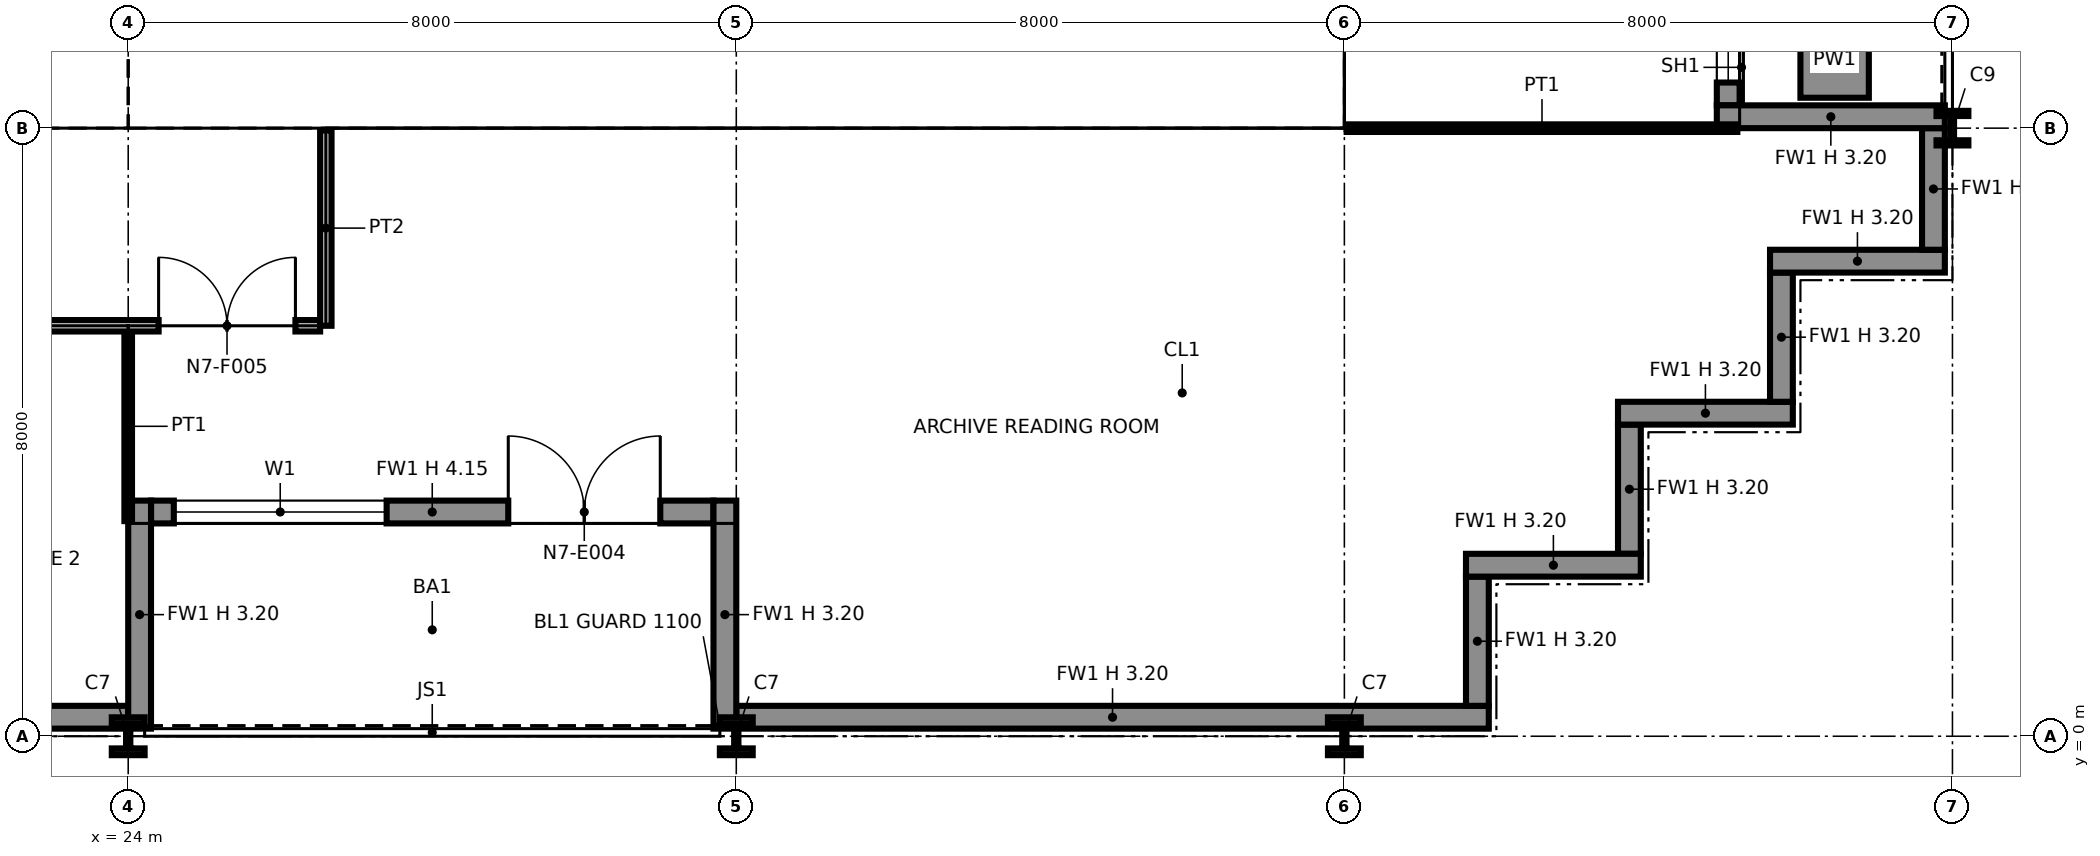
"""IFC4 building model, lengths in metres.
Left out: names, types, materials, properties, quantities, classifications, styles, units other than length and angle.
Written with IfcOpenShell. Run it as: python <this file> out.ifc"""

import sys

from ifc_helpers import new_model, si_unit, direction, frame, frame_2d, origin, origin_2d, place, context, subcontext, project, spatial, polyline, rectangle, i_section, outline, extrude, element, fill, save


model = new_model("IFC4")
c1 = context("Model", 3, precision=1e-05, world=origin(), true_north=direction((0.0, 1.0)))
c2 = subcontext(c1, "Body", "Model", "MODEL_VIEW")
j1 = project(units=[si_unit("LENGTHUNIT", "METRE"), si_unit("PLANEANGLEUNIT", "RADIAN")], contexts=[c1])
p1 = place(None, origin())
s1 = spatial("IfcSite", under=j1, at=p1, CompositionType="ELEMENT")
p2 = place(p1, origin())
s2 = spatial("IfcBuilding", under=s1, at=p2, CompositionType="ELEMENT")
p3 = place(p2, frame((0.0, 0.0, 109.6)))
s3 = spatial("IfcBuildingStorey", under=s2, at=p3, CompositionType="ELEMENT", Elevation=109.6)
p4 = place(p3, frame((24.0, 0.0, 0.0), z_axis=(0.0, 0.0, 1.0), x_axis=(1.0, 0.0, 0.0)))
e1 = element("IfcColumn", 1, at=p4, inside=s3, PredefinedType="COLUMN", context=c2, shape_type="SweptSolid", body=[
    extrude(i_section(OverallWidth=0.432, OverallDepth=0.498, WebThickness=0.056, FlangeThickness=0.089, at=origin_2d()), origin(), (0.0, 0.0, 1.0), 4.15),
])
p5 = place(p3, frame((24.0, 8.0, 0.0), z_axis=(0.0, 0.0, 1.0), x_axis=(1.0, 0.0, 0.0)))
e2 = element("IfcColumn", 2, at=p5, inside=s3, PredefinedType="COLUMN", context=c2, shape_type="SweptSolid", body=[
    extrude(i_section(OverallWidth=0.411, OverallDepth=0.434, WebThickness=0.036, FlangeThickness=0.057, at=origin_2d()), origin(), (0.0, 0.0, 1.0), 4.15),
])
p6 = place(p3, frame((32.0, 0.0, 0.0), z_axis=(0.0, 0.0, 1.0), x_axis=(1.0, 0.0, 0.0)))
e3 = element("IfcColumn", 3, at=p6, inside=s3, PredefinedType="COLUMN", context=c2, shape_type="SweptSolid", body=[
    extrude(i_section(OverallWidth=0.432, OverallDepth=0.498, WebThickness=0.056, FlangeThickness=0.089, at=origin_2d()), origin(), (0.0, 0.0, 1.0), 4.15),
])
p7 = place(p3, frame((32.0, 8.0, 0.0), z_axis=(0.0, 0.0, 1.0), x_axis=(1.0, 0.0, 0.0)))
e4 = element("IfcColumn", 4, at=p7, inside=s3, PredefinedType="COLUMN", context=c2, shape_type="SweptSolid", body=[
    extrude(i_section(OverallWidth=0.406, OverallDepth=0.417, WebThickness=0.03, FlangeThickness=0.048, at=origin_2d()), origin(), (0.0, 0.0, 1.0), 4.15),
])
p8 = place(p3, frame((40.0, 0.0, 0.0), z_axis=(0.0, 0.0, 1.0), x_axis=(1.0, 0.0, 0.0)))
e5 = element("IfcColumn", 5, at=p8, inside=s3, PredefinedType="COLUMN", context=c2, shape_type="SweptSolid", body=[
    extrude(i_section(OverallWidth=0.432, OverallDepth=0.498, WebThickness=0.056, FlangeThickness=0.089, at=origin_2d()), origin(), (0.0, 0.0, 1.0), 4.15),
])
p9 = place(p3, frame((40.0, 8.0, 0.0), z_axis=(0.0, 0.0, 1.0), x_axis=(1.0, 0.0, 0.0)))
e6 = element("IfcColumn", 6, at=p9, inside=s3, PredefinedType="COLUMN", context=c2, shape_type="SweptSolid", body=[
    extrude(i_section(OverallWidth=0.406, OverallDepth=0.417, WebThickness=0.03, FlangeThickness=0.048, at=origin_2d()), origin(), (0.0, 0.0, 1.0), 4.15),
])
p10 = place(p3, frame((48.0, 8.0, 0.0), z_axis=(0.0, 0.0, 1.0), x_axis=(1.0, 0.0, 0.0)))
e7 = element("IfcColumn", 7, at=p10, inside=s3, PredefinedType="COLUMN", context=c2, shape_type="SweptSolid", body=[
    extrude(i_section(OverallWidth=0.419, OverallDepth=0.455, WebThickness=0.042, FlangeThickness=0.068, at=origin_2d()), origin(), (0.0, 0.0, 1.0), 4.15),
])
p11 = place(p3, frame((16.0, 0.25, 0.0), z_axis=(0.0, 0.0, 1.0), x_axis=(1.0, 0.0, 0.0)))
e8 = element("IfcWall", 8, at=p11, inside=s3, PredefinedType="SOLIDWALL", context=c2, shape_type="SweptSolid", body=[
    extrude(rectangle(XDim=8.0, YDim=0.3, at=frame_2d((4.0, 0.0))), origin(), (0.0, 0.0, 1.0), 3.199),
])
p12 = place(p3, frame((24.3, 2.95, 0.0), z_axis=(0.0, 0.0, 1.0), x_axis=(1.0, 0.0, 0.0)))
e9 = element("IfcWall", 9, at=p12, inside=s3, PredefinedType="SOLIDWALL", context=c2, shape_type="SweptSolid", body=[
    extrude(rectangle(XDim=7.4, YDim=0.3, at=frame_2d((3.7, 0.0))), origin(), (0.0, 0.0, 1.0), 4.15),
])
p13 = place(p12, frame((0.3, 0.0, 0.9)))
e10 = element("IfcOpeningElement", 10, at=p13, cuts=e9, PredefinedType="OPENING", context=c2, shape_type="SweptSolid", body=[
    extrude(rectangle(XDim=2.8, YDim=2.2, at=frame_2d((1.4, 1.1))), frame((0.0, 0.16, 0.0), z_axis=(0.0, -1.0, 0.0), x_axis=(1.0, 0.0, 0.0)), (0.0, 0.0, 1.0), 0.32),
])
p14 = place(p12, frame((4.7, 0.0, 0.0)))
e11 = element("IfcOpeningElement", 11, at=p14, cuts=e9, PredefinedType="OPENING", context=c2, shape_type="SweptSolid", body=[
    extrude(rectangle(XDim=2.0, YDim=2.4, at=frame_2d((1.0, 1.2))), frame((0.0, 0.16, 0.0), z_axis=(0.0, -1.0, 0.0), x_axis=(1.0, 0.0, 0.0)), (0.0, 0.0, 1.0), 0.32),
])
for number, where, z_axis, x_axis in (
    (12, (24.15, 0.1, 0.0), (0.0, 0.0, 1.0), (0.0, 1.0, 0.0)),
    (13, (31.85, 0.1, 0.0), (0.0, 0.0, 1.0), (0.0, 1.0, 0.0)),
):
    element("IfcWall", number, at=place(p3, frame(where, z_axis=z_axis, x_axis=x_axis)), inside=s3, PredefinedType="SOLIDWALL", context=c2, shape_type="SweptSolid", body=[
        extrude(rectangle(XDim=3.0, YDim=0.3, at=frame_2d((1.5, 0.0))), origin(), (0.0, 0.0, 1.0), 3.199),
    ])
p15 = place(p3, frame((32.0, 0.25, 0.0), z_axis=(0.0, 0.0, 1.0), x_axis=(1.0, 0.0, 0.0)))
e14 = element("IfcWall", 14, at=p15, inside=s3, PredefinedType="SOLIDWALL", context=c2, shape_type="SweptSolid", body=[
    extrude(rectangle(XDim=9.9, YDim=0.3, at=frame_2d((4.95, 0.0))), origin(), (0.0, 0.0, 1.0), 3.199),
])
p16 = place(p3, frame((41.75, 0.4, 0.0), z_axis=(0.0, 0.0, 1.0), x_axis=(0.0, 1.0, 0.0)))
e15 = element("IfcWall", 15, at=p16, inside=s3, PredefinedType="SOLIDWALL", context=c2, shape_type="SweptSolid", body=[
    extrude(rectangle(XDim=1.7, YDim=0.3, at=frame_2d((0.85, 0.0))), origin(), (0.0, 0.0, 1.0), 3.199),
])
p17 = place(p3, frame((41.6, 2.25, 0.0), z_axis=(0.0, 0.0, 1.0), x_axis=(1.0, 0.0, 0.0)))
e16 = element("IfcWall", 16, at=p17, inside=s3, PredefinedType="SOLIDWALL", context=c2, shape_type="SweptSolid", body=[
    extrude(rectangle(XDim=2.3, YDim=0.3, at=frame_2d((1.15, 0.0))), origin(), (0.0, 0.0, 1.0), 3.199),
])
p18 = place(p3, frame((43.75, 2.4, 0.0), z_axis=(0.0, 0.0, 1.0), x_axis=(0.0, 1.0, 0.0)))
e17 = element("IfcWall", 17, at=p18, inside=s3, PredefinedType="SOLIDWALL", context=c2, shape_type="SweptSolid", body=[
    extrude(rectangle(XDim=1.7, YDim=0.3, at=frame_2d((0.85, 0.0))), origin(), (0.0, 0.0, 1.0), 3.199),
])
p19 = place(p3, frame((43.6, 4.25, 0.0), z_axis=(0.0, 0.0, 1.0), x_axis=(1.0, 0.0, 0.0)))
e18 = element("IfcWall", 18, at=p19, inside=s3, PredefinedType="SOLIDWALL", context=c2, shape_type="SweptSolid", body=[
    extrude(rectangle(XDim=2.3, YDim=0.3, at=frame_2d((1.15, 0.0))), origin(), (0.0, 0.0, 1.0), 3.199),
])
p20 = place(p3, frame((45.75, 4.4, 0.0), z_axis=(0.0, 0.0, 1.0), x_axis=(0.0, 1.0, 0.0)))
e19 = element("IfcWall", 19, at=p20, inside=s3, PredefinedType="SOLIDWALL", context=c2, shape_type="SweptSolid", body=[
    extrude(rectangle(XDim=1.7, YDim=0.3, at=frame_2d((0.85, 0.0))), origin(), (0.0, 0.0, 1.0), 3.199),
])
p21 = place(p3, frame((45.6, 6.25, 0.0), z_axis=(0.0, 0.0, 1.0), x_axis=(1.0, 0.0, 0.0)))
e20 = element("IfcWall", 20, at=p21, inside=s3, PredefinedType="SOLIDWALL", context=c2, shape_type="SweptSolid", body=[
    extrude(rectangle(XDim=2.3, YDim=0.3, at=frame_2d((1.15, 0.0))), origin(), (0.0, 0.0, 1.0), 3.199),
])
p22 = place(p3, frame((47.75, 6.4, 0.0), z_axis=(0.0, 0.0, 1.0), x_axis=(0.0, 1.0, 0.0)))
e21 = element("IfcWall", 21, at=p22, inside=s3, PredefinedType="SOLIDWALL", context=c2, shape_type="SweptSolid", body=[
    extrude(rectangle(XDim=1.6, YDim=0.3, at=frame_2d((0.8, 0.0))), origin(), (0.0, 0.0, 1.0), 3.199),
])
p23 = place(p3, frame((45.05, 8.3, 0.0), z_axis=(0.0, 0.0, 1.0), x_axis=(0.0, 1.0, 0.0)))
e22 = element("IfcWall", 22, at=p23, inside=s3, PredefinedType="SOLIDWALL", context=c2, shape_type="SweptSolid", body=[
    extrude(rectangle(XDim=7.4, YDim=0.3, at=frame_2d((3.7, 0.0))), origin(), (0.0, 0.0, 1.0), 3.547),
])
p24 = place(p23, frame((0.3, 0.0, 0.9)))
e23 = element("IfcOpeningElement", 23, at=p24, cuts=e22, PredefinedType="OPENING", context=c2, shape_type="SweptSolid", body=[
    extrude(rectangle(XDim=2.8, YDim=2.2, at=frame_2d((1.4, 1.1))), frame((0.0, 0.16, 0.0), z_axis=(0.0, -1.0, 0.0), x_axis=(1.0, 0.0, 0.0)), (0.0, 0.0, 1.0), 0.32),
])
p25 = place(p23, frame((4.7, 0.0, 0.0)))
e24 = element("IfcOpeningElement", 24, at=p25, cuts=e22, PredefinedType="OPENING", context=c2, shape_type="SweptSolid", body=[
    extrude(rectangle(XDim=2.0, YDim=2.4, at=frame_2d((1.0, 1.2))), frame((0.0, 0.16, 0.0), z_axis=(0.0, -1.0, 0.0), x_axis=(1.0, 0.0, 0.0)), (0.0, 0.0, 1.0), 0.32),
])
p26 = place(p3, frame((47.9, 8.15, 0.0), z_axis=(0.0, 0.0, 1.0), x_axis=(-1.0, 0.0, 0.0)))
e25 = element("IfcWall", 25, at=p26, inside=s3, PredefinedType="SOLIDWALL", context=c2, shape_type="SweptSolid", body=[
    extrude(rectangle(XDim=3.0, YDim=0.3, at=frame_2d((1.5, 0.0))), origin(), (0.0, 0.0, 1.0), 3.199),
])
p27 = place(p3, frame((46.45, 8.4, 0.0), z_axis=(0.0, 0.0, 1.0), x_axis=(0.0, 1.0, 0.0)))
e26 = element("IfcWall", 26, at=p27, inside=s3, PredefinedType="SOLIDWALL", context=c2, shape_type="SweptSolid", body=[
    extrude(rectangle(XDim=3.2, YDim=0.9, at=frame_2d((1.6, 0.0))), origin(), (0.0, 0.0, 1.0), 0.6),
])
p28 = place(p3, frame((8.65, 8.75, 0.0), z_axis=(0.0, 0.0, 1.0), x_axis=(1.0, 0.0, 0.0)))
e27 = element("IfcWall", 27, at=p28, inside=s3, PredefinedType="PARTITIONING", context=c2, shape_type="SweptSolid", body=[
    extrude(outline(polyline([(0.0, 0.0), (14.7, 0.0), (14.7, 4.15), (7.489, 4.15), (7.488, 3.382), (7.212, 3.382), (7.211, 4.15), (0.0, 4.15), (0.0, 0.0)])), frame((0.0, 0.1, 0.0), z_axis=(0.0, -1.0, 0.0), x_axis=(1.0, 0.0, 0.0)), (0.0, 0.0, 1.0), 0.2),
])
p29 = place(p28, frame((1.3, 0.0, 0.0)))
e28 = element("IfcOpeningElement", 28, at=p29, cuts=e27, PredefinedType="OPENING", context=c2, shape_type="SweptSolid", body=[
    extrude(rectangle(XDim=1.4, YDim=2.1, at=frame_2d((0.7, 1.05))), frame((0.0, 0.11, 0.0), z_axis=(0.0, -1.0, 0.0), x_axis=(1.0, 0.0, 0.0)), (0.0, 0.0, 1.0), 0.22),
])
p30 = place(p28, frame((4.6, 0.0, 0.0)))
e29 = element("IfcOpeningElement", 29, at=p30, cuts=e27, PredefinedType="OPENING", context=c2, shape_type="SweptSolid", body=[
    extrude(rectangle(XDim=1.4, YDim=2.1, at=frame_2d((0.7, 1.05))), frame((0.0, 0.11, 0.0), z_axis=(0.0, -1.0, 0.0), x_axis=(1.0, 0.0, 0.0)), (0.0, 0.0, 1.0), 0.22),
])
p31 = place(p28, frame((10.4, 0.0, 0.0)))
e30 = element("IfcOpeningElement", 30, at=p31, cuts=e27, PredefinedType="OPENING", context=c2, shape_type="SweptSolid", body=[
    extrude(rectangle(XDim=1.2, YDim=2.1, at=frame_2d((0.6, 1.05))), frame((0.0, 0.11, 0.0), z_axis=(0.0, -1.0, 0.0), x_axis=(1.0, 0.0, 0.0)), (0.0, 0.0, 1.0), 0.22),
])
p32 = place(p3, frame((23.25, 8.85, 0.0), z_axis=(0.0, 0.0, 1.0), x_axis=(0.0, 1.0, 0.0)))
e31 = element("IfcWall", 31, at=p32, inside=s3, PredefinedType="PARTITIONING", context=c2, shape_type="SweptSolid", body=[
    extrude(outline(polyline([(0.0, 0.0), (14.3, 0.0), (14.3, 4.15), (11.269, 4.15), (11.268, 3.542), (11.032, 3.542), (11.031, 4.15), (7.289, 4.15), (7.288, 3.382), (7.012, 3.382), (7.011, 4.15), (1.269, 4.15), (1.268, 3.542), (1.032, 3.542), (1.031, 4.15), (0.0, 4.15), (0.0, 0.0)])), frame((0.0, 0.1, 0.0), z_axis=(0.0, -1.0, 0.0), x_axis=(1.0, 0.0, 0.0)), (0.0, 0.0, 1.0), 0.2),
])
p33 = place(p32, frame((8.3, 0.0, 0.0)))
e32 = element("IfcOpeningElement", 32, at=p33, cuts=e31, PredefinedType="OPENING", context=c2, shape_type="SweptSolid", body=[
    extrude(rectangle(XDim=1.8, YDim=2.1, at=frame_2d((0.9, 1.05))), frame((0.0, 0.11, 0.0), z_axis=(0.0, -1.0, 0.0), x_axis=(1.0, 0.0, 0.0)), (0.0, 0.0, 1.0), 0.22),
])
p34 = place(p3, frame((24.65, 8.75, 0.0), z_axis=(0.0, 0.0, 1.0), x_axis=(1.0, 0.0, 0.0)))
e33 = element("IfcWall", 33, at=p34, inside=s3, PredefinedType="PARTITIONING", context=c2, shape_type="SweptSolid", body=[
    extrude(outline(polyline([(0.0, 0.0), (14.7, 0.0), (14.7, 4.15), (7.489, 4.15), (7.488, 3.382), (7.212, 3.382), (7.211, 4.15), (0.0, 4.15), (0.0, 0.0)])), frame((0.0, 0.1, 0.0), z_axis=(0.0, -1.0, 0.0), x_axis=(1.0, 0.0, 0.0)), (0.0, 0.0, 1.0), 0.2),
])
p35 = place(p3, frame((24.75, 8.85, 0.0), z_axis=(0.0, 0.0, 1.0), x_axis=(0.0, 1.0, 0.0)))
e34 = element("IfcWall", 34, at=p35, inside=s3, PredefinedType="PARTITIONING", context=c2, shape_type="SweptSolid", body=[
    extrude(outline(polyline([(0.0, 0.0), (6.3, 0.0), (6.3, 4.15), (3.269, 4.15), (3.268, 3.542), (3.032, 3.542), (3.031, 4.15), (0.0, 4.15), (0.0, 0.0)])), frame((0.0, 0.1, 0.0), z_axis=(0.0, -1.0, 0.0), x_axis=(1.0, 0.0, 0.0)), (0.0, 0.0, 1.0), 0.2),
])
for number, where, z_axis, x_axis in (
    (35, (27.075, 8.85, 0.0), (0.0, 0.0, 1.0), (0.0, 1.0, 0.0)),
    (36, (29.225, 8.85, 0.0), (0.0, 0.0, 1.0), (0.0, 1.0, 0.0)),
):
    element("IfcWall", number, at=place(p3, frame(where, z_axis=z_axis, x_axis=x_axis)), inside=s3, PredefinedType="PARTITIONING", context=c2, shape_type="SweptSolid", body=[
        extrude(rectangle(XDim=3.0, YDim=0.15, at=frame_2d((1.5, 0.0))), origin(), (0.0, 0.0, 1.0), 4.15),
    ])
p36 = place(p3, frame((32.0, 8.85, 0.0), z_axis=(0.0, 0.0, 1.0), x_axis=(0.0, 1.0, 0.0)))
e37 = element("IfcWall", 37, at=p36, inside=s3, PredefinedType="PARTITIONING", context=c2, shape_type="SweptSolid", body=[
    extrude(rectangle(XDim=3.0, YDim=0.6, at=frame_2d((1.5, 0.0))), origin(), (0.0, 0.0, 1.0), 3.382),
])
for number, where, z_axis, x_axis in (
    (38, (35.6, 8.85, 0.0), (0.0, 0.0, 1.0), (0.0, 1.0, 0.0)),
    (39, (39.25, 8.85, 0.0), (0.0, 0.0, 1.0), (0.0, 1.0, 0.0)),
):
    element("IfcWall", number, at=place(p3, frame(where, z_axis=z_axis, x_axis=x_axis)), inside=s3, PredefinedType="PARTITIONING", context=c2, shape_type="SweptSolid", body=[
        extrude(rectangle(XDim=6.3, YDim=0.2, at=frame_2d((3.15, 0.0))), origin(), (0.0, 0.0, 1.0), 4.15),
    ])
p37 = place(p3, frame((24.0, 2.83, 0.0), z_axis=(0.0, 0.0, 1.0), x_axis=(0.0, 1.0, 0.0)))
e40 = element("IfcWall", 40, at=p37, inside=s3, PredefinedType="PARTITIONING", context=c2, shape_type="SweptSolid", body=[
    extrude(rectangle(XDim=2.495, YDim=0.1, at=frame_2d((1.248, 0.0))), origin(), (0.0, 0.0, 1.0), 3.194),
])
p38 = place(p3, frame((5.475, 5.4, 0.0), z_axis=(0.0, 0.0, 1.0), x_axis=(1.0, 0.0, 0.0)))
e41 = element("IfcWall", 41, at=p38, inside=s3, PredefinedType="PARTITIONING", context=c2, shape_type="SweptSolid", body=[
    extrude(rectangle(XDim=21.05, YDim=0.15, at=frame_2d((10.525, 0.0))), origin(), (0.0, 0.0, 1.0), 3.194),
])
p39 = place(p38, frame((13.025, 0.0, 0.0), z_axis=(0.0, 0.0, 1.0), x_axis=(-1.0, 0.0, 0.0)))
e42 = element("IfcOpeningElement", 42, at=p39, cuts=e41, PredefinedType="OPENING", context=c2, shape_type="SweptSolid", body=[
    extrude(rectangle(XDim=1.0, YDim=2.1, at=frame_2d((0.5, 1.05))), frame((0.0, 0.085, 0.0), z_axis=(0.0, -1.0, 0.0), x_axis=(1.0, 0.0, 0.0)), (0.0, 0.0, 1.0), 0.17),
])
p40 = place(p38, frame((17.025, 0.0, 0.0), z_axis=(0.0, 0.0, 1.0), x_axis=(-1.0, 0.0, 0.0)))
e43 = element("IfcOpeningElement", 43, at=p40, cuts=e41, PredefinedType="OPENING", context=c2, shape_type="SweptSolid", body=[
    extrude(rectangle(XDim=1.0, YDim=2.1, at=frame_2d((0.5, 1.05))), frame((0.0, 0.085, 0.0), z_axis=(0.0, -1.0, 0.0), x_axis=(1.0, 0.0, 0.0)), (0.0, 0.0, 1.0), 0.17),
])
p41 = place(p38, frame((5.025, 0.0, 0.0), z_axis=(0.0, 0.0, 1.0), x_axis=(-1.0, 0.0, 0.0)))
e44 = element("IfcOpeningElement", 44, at=p41, cuts=e41, PredefinedType="OPENING", context=c2, shape_type="SweptSolid", body=[
    extrude(rectangle(XDim=1.0, YDim=2.1, at=frame_2d((0.5, 1.05))), frame((0.0, 0.085, 0.0), z_axis=(0.0, -1.0, 0.0), x_axis=(1.0, 0.0, 0.0)), (0.0, 0.0, 1.0), 0.17),
])
p42 = place(p38, frame((9.025, 0.0, 0.0), z_axis=(0.0, 0.0, 1.0), x_axis=(-1.0, 0.0, 0.0)))
e45 = element("IfcOpeningElement", 45, at=p42, cuts=e41, PredefinedType="OPENING", context=c2, shape_type="SweptSolid", body=[
    extrude(rectangle(XDim=1.0, YDim=2.1, at=frame_2d((0.5, 1.05))), frame((0.0, 0.085, 0.0), z_axis=(0.0, -1.0, 0.0), x_axis=(1.0, 0.0, 0.0)), (0.0, 0.0, 1.0), 0.17),
])
p43 = place(p38, frame((18.925, 0.0, 0.0)))
e46 = element("IfcOpeningElement", 46, at=p43, cuts=e41, PredefinedType="OPENING", context=c2, shape_type="SweptSolid", body=[
    extrude(rectangle(XDim=1.8, YDim=2.1, at=frame_2d((0.9, 1.05))), frame((0.0, 0.085, 0.0), z_axis=(0.0, -1.0, 0.0), x_axis=(1.0, 0.0, 0.0)), (0.0, 0.0, 1.0), 0.17),
])
p44 = place(p3, frame((26.6, 5.4, 0.0), z_axis=(0.0, 0.0, 1.0), x_axis=(0.0, 1.0, 0.0)))
e47 = element("IfcWall", 47, at=p44, inside=s3, PredefinedType="PARTITIONING", context=c2, shape_type="SweptSolid", body=[
    extrude(rectangle(XDim=2.57, YDim=0.15, at=frame_2d((1.285, 0.0))), origin(), (0.0, 0.0, 1.0), 3.194),
])
p45 = place(p3, frame((40.03, 8.0, 0.0), z_axis=(0.0, 0.0, 1.0), x_axis=(1.0, 0.0, 0.0)))
e48 = element("IfcWall", 48, at=p45, inside=s3, PredefinedType="PARTITIONING", context=c2, shape_type="SweptSolid", body=[
    extrude(rectangle(XDim=5.14, YDim=0.1, at=frame_2d((2.57, 0.0))), origin(), (0.0, 0.0, 1.0), 3.194),
])
p46 = place(p13, origin())
e49 = element("IfcWindow", 49, at=p46, inside=s3, PartitioningType="SINGLE_PANEL", PredefinedType="WINDOW", context=c2, shape_type="SweptSolid", body=[
    extrude(rectangle(XDim=2.8, YDim=2.2, at=frame_2d((1.4, 1.1))), frame((0.0, 0.03, 0.0), z_axis=(0.0, -1.0, 0.0), x_axis=(1.0, 0.0, 0.0)), (0.0, 0.0, 1.0), 0.06),
])
fill(e10, e49)
p47 = place(p14, origin())
e50 = element("IfcDoor", 50, at=p47, inside=s3, OperationType="DOUBLE_DOOR_SINGLE_SWING", PredefinedType="DOOR", context=c2, shape_type="SweptSolid", body=[
    extrude(rectangle(XDim=2.0, YDim=2.4, at=frame_2d((1.0, 1.2))), frame((0.0, 0.025, 0.0), z_axis=(0.0, -1.0, 0.0), x_axis=(1.0, 0.0, 0.0)), (0.0, 0.0, 1.0), 0.05),
])
fill(e11, e50)
p48 = place(p24, origin())
e51 = element("IfcWindow", 51, at=p48, inside=s3, PartitioningType="SINGLE_PANEL", PredefinedType="WINDOW", context=c2, shape_type="SweptSolid", body=[
    extrude(rectangle(XDim=2.8, YDim=2.2, at=frame_2d((1.4, 1.1))), frame((0.0, 0.03, 0.0), z_axis=(0.0, -1.0, 0.0), x_axis=(1.0, 0.0, 0.0)), (0.0, 0.0, 1.0), 0.06),
])
fill(e23, e51)
p49 = place(p43, origin())
e52 = element("IfcDoor", 52, at=p49, inside=s3, OperationType="DOUBLE_DOOR_SINGLE_SWING", PredefinedType="DOOR", context=c2, shape_type="SweptSolid", body=[
    extrude(rectangle(XDim=1.8, YDim=2.1, at=frame_2d((0.9, 1.05))), frame((0.0, 0.025, 0.0), z_axis=(0.0, -1.0, 0.0), x_axis=(1.0, 0.0, 0.0)), (0.0, 0.0, 1.0), 0.05),
])
fill(e46, e52)
save(model, sys.argv[1])
